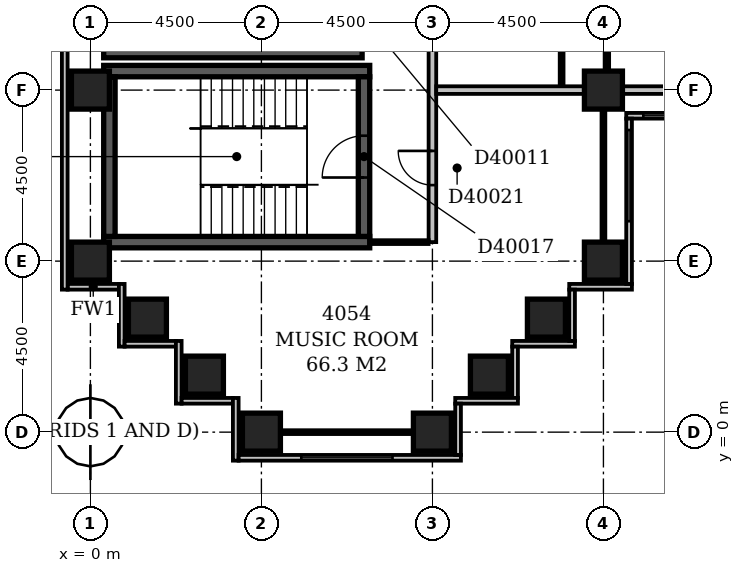
"""IFC4 building model, lengths in metres.
Left out: names, types, materials, properties, quantities, classifications, styles, units other than length and angle.
Written with IfcOpenShell. Run it as: python <this file> out.ifc"""

import sys

from ifc_helpers import new_model, si_unit, direction, frame, frame_2d, origin, origin_2d, place, context, subcontext, project, spatial, rectangle, extrude, element, fill, save


model = new_model("IFC4")
c1 = context("Model", 3, precision=1e-05, world=origin(), true_north=direction((0.0, 1.0)))
c2 = subcontext(c1, "Body", "Model", "MODEL_VIEW")
j1 = project(units=[si_unit("LENGTHUNIT", "METRE"), si_unit("PLANEANGLEUNIT", "RADIAN")], contexts=[c1])
p1 = place(None, origin())
s1 = spatial("IfcSite", under=j1, at=p1, CompositionType="ELEMENT")
p2 = place(p1, origin())
s2 = spatial("IfcBuilding", under=s1, at=p2, CompositionType="ELEMENT")
p3 = place(p2, frame((0.0, 0.0, 159.2)))
s3 = spatial("IfcBuildingStorey", under=s2, at=p3, CompositionType="ELEMENT", Elevation=159.2)
for number, where, z_axis, x_axis in (
    (1, (0.35, 5.0, -0.3), (0.0, 0.0, 1.0), (1.0, 0.0, 0.0)),
    (2, (0.35, 9.5, -0.3), (0.0, 0.0, 1.0), (1.0, 0.0, 0.0)),
):
    element("IfcWall", number, at=place(p3, frame(where, z_axis=z_axis, x_axis=x_axis)), inside=s3, PredefinedType="SHEAR", context=c2, shape_type="SweptSolid", body=[
        extrude(rectangle(XDim=7.0, YDim=0.3, at=frame_2d((3.5, 0.0))), origin(), (0.0, 0.0, 1.0), 3.6),
    ])
p4 = place(p3, frame((0.35, 10.0, -0.3), z_axis=(0.0, 0.0, 1.0), x_axis=(1.0, 0.0, 0.0)))
e3 = element("IfcWall", 3, at=p4, inside=s3, PredefinedType="SHEAR", context=c2, shape_type="SweptSolid", body=[
    extrude(rectangle(XDim=6.8, YDim=0.3, at=frame_2d((3.4, 0.0))), origin(), (0.0, 0.0, 1.0), 3.6),
])
p5 = place(p3, frame((0.5, 5.15, -0.3), z_axis=(0.0, 0.0, 1.0), x_axis=(0.0, 1.0, 0.0)))
e4 = element("IfcWall", 4, at=p5, inside=s3, PredefinedType="SHEAR", context=c2, shape_type="SweptSolid", body=[
    extrude(rectangle(XDim=4.2, YDim=0.3, at=frame_2d((2.1, 0.0))), origin(), (0.0, 0.0, 1.0), 3.6),
])
p6 = place(p3, frame((7.2, 5.15, -0.3), z_axis=(0.0, 0.0, 1.0), x_axis=(0.0, 1.0, 0.0)))
e5 = element("IfcWall", 5, at=p6, inside=s3, PredefinedType="SHEAR", context=c2, shape_type="SweptSolid", body=[
    extrude(rectangle(XDim=4.2, YDim=0.3, at=frame_2d((2.1, 0.0))), origin(), (0.0, 0.0, 1.0), 3.6),
])
p7 = place(p6, frame((1.55, 0.0, 0.3)))
e6 = element("IfcOpeningElement", 6, at=p7, cuts=e5, PredefinedType="OPENING", context=c2, shape_type="SweptSolid", body=[
    extrude(rectangle(XDim=1.1, YDim=2.1, at=frame_2d((0.55, 1.05))), frame((0.0, 0.162, 0.0), z_axis=(0.0, -1.0, 0.0), x_axis=(1.0, 0.0, 0.0)), (0.0, 0.0, 1.0), 0.324),
])
for number, where, z_axis, x_axis in (
    (7, (4.5, 0.0, -0.3), (0.0, 0.0, 1.0), (1.0, 0.0, 0.0)),
    (8, (9.0, 0.0, -0.3), (0.0, 0.0, 1.0), (1.0, 0.0, 0.0)),
    (9, (3.0, 1.5, -0.3), (0.0, 0.0, 1.0), (1.0, 0.0, 0.0)),
    (10, (10.5, 1.5, -0.3), (0.0, 0.0, 1.0), (1.0, 0.0, 0.0)),
    (11, (1.5, 3.0, -0.3), (0.0, 0.0, 1.0), (1.0, 0.0, 0.0)),
    (12, (12.0, 3.0, -0.3), (0.0, 0.0, 1.0), (1.0, 0.0, 0.0)),
    (13, (0.0, 4.5, -0.3), (0.0, 0.0, 1.0), (1.0, 0.0, 0.0)),
    (14, (13.5, 4.5, -0.3), (0.0, 0.0, 1.0), (1.0, 0.0, 0.0)),
    (15, (0.0, 9.0, -0.3), (0.0, 0.0, 1.0), (1.0, 0.0, 0.0)),
    (16, (13.5, 9.0, -0.3), (0.0, 0.0, 1.0), (1.0, 0.0, 0.0)),
):
    element("IfcColumn", number, at=place(p3, frame(where, z_axis=z_axis, x_axis=x_axis)), inside=s3, PredefinedType="COLUMN", context=c2, shape_type="SweptSolid", body=[
        extrude(rectangle(XDim=1.0, YDim=1.0, at=origin_2d()), origin(), (0.0, 0.0, 1.0), 3.6),
    ])
p8 = place(p3, frame((9.675, -0.6, 0.0), z_axis=(0.0, 0.0, 1.0), x_axis=(0.0, 1.0, 0.0)))
e17 = element("IfcWall", 17, at=p8, inside=s3, PredefinedType="STANDARD", context=c2, shape_type="SweptSolid", body=[
    extrude(rectangle(XDim=1.35, YDim=0.15, at=frame_2d((0.675, 0.0))), origin(), (0.0, 0.0, 1.0), 2.7),
])
p9 = place(p3, frame((9.6, 0.825, 0.0), z_axis=(0.0, 0.0, 1.0), x_axis=(1.0, 0.0, 0.0)))
e18 = element("IfcWall", 18, at=p9, inside=s3, PredefinedType="STANDARD", context=c2, shape_type="SweptSolid", body=[
    extrude(rectangle(XDim=1.65, YDim=0.15, at=frame_2d((0.825, 0.0))), origin(), (0.0, 0.0, 1.0), 2.7),
])
p10 = place(p3, frame((11.175, 0.9, 0.0), z_axis=(0.0, 0.0, 1.0), x_axis=(0.0, 1.0, 0.0)))
e19 = element("IfcWall", 19, at=p10, inside=s3, PredefinedType="STANDARD", context=c2, shape_type="SweptSolid", body=[
    extrude(rectangle(XDim=1.35, YDim=0.15, at=frame_2d((0.675, 0.0))), origin(), (0.0, 0.0, 1.0), 2.7),
])
p11 = place(p3, frame((11.1, 2.325, 0.0), z_axis=(0.0, 0.0, 1.0), x_axis=(1.0, 0.0, 0.0)))
e20 = element("IfcWall", 20, at=p11, inside=s3, PredefinedType="STANDARD", context=c2, shape_type="SweptSolid", body=[
    extrude(rectangle(XDim=1.65, YDim=0.15, at=frame_2d((0.825, 0.0))), origin(), (0.0, 0.0, 1.0), 2.7),
])
p12 = place(p3, frame((12.675, 2.4, 0.0), z_axis=(0.0, 0.0, 1.0), x_axis=(0.0, 1.0, 0.0)))
e21 = element("IfcWall", 21, at=p12, inside=s3, PredefinedType="STANDARD", context=c2, shape_type="SweptSolid", body=[
    extrude(rectangle(XDim=1.35, YDim=0.15, at=frame_2d((0.675, 0.0))), origin(), (0.0, 0.0, 1.0), 2.7),
])
p13 = place(p3, frame((12.6, 3.825, 0.0), z_axis=(0.0, 0.0, 1.0), x_axis=(1.0, 0.0, 0.0)))
e22 = element("IfcWall", 22, at=p13, inside=s3, PredefinedType="STANDARD", context=c2, shape_type="SweptSolid", body=[
    extrude(rectangle(XDim=1.65, YDim=0.15, at=frame_2d((0.825, 0.0))), origin(), (0.0, 0.0, 1.0), 2.7),
])
p14 = place(p3, frame((14.175, 3.9, 0.0), z_axis=(0.0, 0.0, 1.0), x_axis=(0.0, 1.0, 0.0)))
e23 = element("IfcWall", 23, at=p14, inside=s3, PredefinedType="STANDARD", context=c2, shape_type="SweptSolid", body=[
    extrude(rectangle(XDim=4.35, YDim=0.15, at=frame_2d((2.175, 0.0))), origin(), (0.0, 0.0, 1.0), 2.7),
])
p15 = place(p14, frame((1.65, 0.0, 0.6)))
e24 = element("IfcOpeningElement", 24, at=p15, cuts=e23, PredefinedType="OPENING", context=c2, shape_type="SweptSolid", body=[
    extrude(rectangle(XDim=2.4, YDim=1.8, at=frame_2d((1.2, 0.9))), frame((0.0, 0.087, 0.0), z_axis=(0.0, -1.0, 0.0), x_axis=(1.0, 0.0, 0.0)), (0.0, 0.0, 1.0), 0.174),
])
p16 = place(p3, frame((14.1, 8.325, 0.0), z_axis=(0.0, 0.0, 1.0), x_axis=(1.0, 0.0, 0.0)))
e25 = element("IfcWall", 25, at=p16, inside=s3, PredefinedType="STANDARD", context=c2, shape_type="SweptSolid", body=[
    extrude(rectangle(XDim=4.65, YDim=0.15, at=frame_2d((2.325, 0.0))), origin(), (0.0, 0.0, 1.0), 2.7),
])
p17 = place(p16, frame((0.45, 0.0, 0.6)))
e26 = element("IfcOpeningElement", 26, at=p17, cuts=e25, PredefinedType="OPENING", context=c2, shape_type="SweptSolid", body=[
    extrude(rectangle(XDim=2.4, YDim=1.8, at=frame_2d((1.2, 0.9))), frame((0.0, 0.087, 0.0), z_axis=(0.0, -1.0, 0.0), x_axis=(1.0, 0.0, 0.0)), (0.0, 0.0, 1.0), 0.174),
])
p18 = place(p3, frame((-0.675, 59.1, 0.0), z_axis=(0.0, 0.0, 1.0), x_axis=(0.0, -1.0, 0.0)))
e27 = element("IfcWall", 27, at=p18, inside=s3, PredefinedType="STANDARD", context=c2, shape_type="SweptSolid", body=[
    extrude(rectangle(XDim=55.35, YDim=0.15, at=frame_2d((27.675, 0.0))), origin(), (0.0, 0.0, 1.0), 2.7),
])
p19 = place(p18, frame((43.04, 0.0, 0.6)))
e28 = element("IfcOpeningElement", 28, at=p19, cuts=e27, PredefinedType="OPENING", context=c2, shape_type="SweptSolid", body=[
    extrude(rectangle(XDim=1.8, YDim=1.8, at=frame_2d((0.9, 0.9))), frame((0.0, 0.087, 0.0), z_axis=(0.0, -1.0, 0.0), x_axis=(1.0, 0.0, 0.0)), (0.0, 0.0, 1.0), 0.174),
])
p20 = place(p3, frame((-0.6, 3.825, 0.0), z_axis=(0.0, 0.0, 1.0), x_axis=(1.0, 0.0, 0.0)))
e29 = element("IfcWall", 29, at=p20, inside=s3, PredefinedType="STANDARD", context=c2, shape_type="SweptSolid", body=[
    extrude(rectangle(XDim=1.35, YDim=0.15, at=frame_2d((0.675, 0.0))), origin(), (0.0, 0.0, 1.0), 2.7),
])
p21 = place(p3, frame((0.825, 3.9, 0.0), z_axis=(0.0, 0.0, 1.0), x_axis=(0.0, -1.0, 0.0)))
e30 = element("IfcWall", 30, at=p21, inside=s3, PredefinedType="STANDARD", context=c2, shape_type="SweptSolid", body=[
    extrude(rectangle(XDim=1.65, YDim=0.15, at=frame_2d((0.825, 0.0))), origin(), (0.0, 0.0, 1.0), 2.7),
])
p22 = place(p3, frame((0.9, 2.325, 0.0), z_axis=(0.0, 0.0, 1.0), x_axis=(1.0, 0.0, 0.0)))
e31 = element("IfcWall", 31, at=p22, inside=s3, PredefinedType="STANDARD", context=c2, shape_type="SweptSolid", body=[
    extrude(rectangle(XDim=1.35, YDim=0.15, at=frame_2d((0.675, 0.0))), origin(), (0.0, 0.0, 1.0), 2.7),
])
p23 = place(p3, frame((2.325, 2.4, 0.0), z_axis=(0.0, 0.0, 1.0), x_axis=(0.0, -1.0, 0.0)))
e32 = element("IfcWall", 32, at=p23, inside=s3, PredefinedType="STANDARD", context=c2, shape_type="SweptSolid", body=[
    extrude(rectangle(XDim=1.65, YDim=0.15, at=frame_2d((0.825, 0.0))), origin(), (0.0, 0.0, 1.0), 2.7),
])
p24 = place(p3, frame((2.4, 0.825, 0.0), z_axis=(0.0, 0.0, 1.0), x_axis=(1.0, 0.0, 0.0)))
e33 = element("IfcWall", 33, at=p24, inside=s3, PredefinedType="STANDARD", context=c2, shape_type="SweptSolid", body=[
    extrude(rectangle(XDim=1.35, YDim=0.15, at=frame_2d((0.675, 0.0))), origin(), (0.0, 0.0, 1.0), 2.7),
])
p25 = place(p3, frame((3.825, 0.9, 0.0), z_axis=(0.0, 0.0, 1.0), x_axis=(0.0, -1.0, 0.0)))
e34 = element("IfcWall", 34, at=p25, inside=s3, PredefinedType="STANDARD", context=c2, shape_type="SweptSolid", body=[
    extrude(rectangle(XDim=1.65, YDim=0.15, at=frame_2d((0.825, 0.0))), origin(), (0.0, 0.0, 1.0), 2.7),
])
p26 = place(p3, frame((3.9, -0.675, 0.0), z_axis=(0.0, 0.0, 1.0), x_axis=(1.0, 0.0, 0.0)))
e35 = element("IfcWall", 35, at=p26, inside=s3, PredefinedType="STANDARD", context=c2, shape_type="SweptSolid", body=[
    extrude(rectangle(XDim=5.85, YDim=0.15, at=frame_2d((2.925, 0.0))), origin(), (0.0, 0.0, 1.0), 2.7),
])
p27 = place(p26, frame((1.65, 0.0, 0.6)))
e36 = element("IfcOpeningElement", 36, at=p27, cuts=e35, PredefinedType="OPENING", context=c2, shape_type="SweptSolid", body=[
    extrude(rectangle(XDim=2.4, YDim=1.8, at=frame_2d((1.2, 0.9))), frame((0.0, 0.087, 0.0), z_axis=(0.0, -1.0, 0.0), x_axis=(1.0, 0.0, 0.0)), (0.0, 0.0, 1.0), 0.174),
])
p28 = place(p3, frame((5.0, 0.0, 0.0), z_axis=(0.0, 0.0, 1.0), x_axis=(1.0, 0.0, 0.0)))
e37 = element("IfcWall", 37, at=p28, inside=s3, PredefinedType="PARTITIONING", context=c2, shape_type="SweptSolid", body=[
    extrude(rectangle(XDim=3.5, YDim=0.1, at=frame_2d((1.75, 0.0))), origin(), (0.0, 0.0, 1.0), 2.7),
])
p29 = place(p3, frame((0.0, 4.5, 0.0), z_axis=(0.0, 0.0, 1.0), x_axis=(0.0, 1.0, 0.0)))
e38 = element("IfcWall", 38, at=p29, inside=s3, PredefinedType="PARTITIONING", context=c2, shape_type="SweptSolid", body=[
    extrude(rectangle(XDim=0.5, YDim=0.1, at=frame_2d((0.25, 0.0))), origin(), (0.0, 0.0, 1.0), 2.7),
])
p30 = place(p3, frame((7.349, 5.0, 0.0), z_axis=(0.0, 0.0, 1.0), x_axis=(1.0, 0.0, 0.0)))
e39 = element("IfcWall", 39, at=p30, inside=s3, PredefinedType="PARTITIONING", context=c2, shape_type="SweptSolid", body=[
    extrude(rectangle(XDim=1.551, YDim=0.1, at=frame_2d((0.775, 0.0))), origin(), (0.0, 0.0, 1.0), 3.3),
])
p31 = place(p3, frame((9.0, 5.0, 0.0), z_axis=(0.0, 0.0, 1.0), x_axis=(0.0, 1.0, 0.0)))
e40 = element("IfcWall", 40, at=p31, inside=s3, PredefinedType="PARTITIONING", context=c2, shape_type="SweptSolid", body=[
    extrude(rectangle(XDim=27.75, YDim=0.2, at=frame_2d((13.875, 0.0))), origin(), (0.0, 0.0, 1.0), 3.3),
])
p32 = place(p31, frame((22.8, 0.0, 0.0)))
e41 = element("IfcOpeningElement", 41, at=p32, cuts=e40, PredefinedType="OPENING", context=c2, shape_type="SweptSolid", body=[
    extrude(rectangle(XDim=1.0, YDim=2.1, at=frame_2d((0.5, 1.05))), frame((0.0, 0.112, 0.0), z_axis=(0.0, -1.0, 0.0), x_axis=(1.0, 0.0, 0.0)), (0.0, 0.0, 1.0), 0.224),
])
p33 = place(p31, frame((14.95, 0.0, 0.0)))
e42 = element("IfcOpeningElement", 42, at=p33, cuts=e40, PredefinedType="OPENING", context=c2, shape_type="SweptSolid", body=[
    extrude(rectangle(XDim=1.0, YDim=2.1, at=frame_2d((0.5, 1.05))), frame((0.0, 0.112, 0.0), z_axis=(0.0, -1.0, 0.0), x_axis=(1.0, 0.0, 0.0)), (0.0, 0.0, 1.0), 0.224),
])
p34 = place(p31, frame((9.3, 0.0, 0.0)))
e43 = element("IfcOpeningElement", 43, at=p34, cuts=e40, PredefinedType="OPENING", context=c2, shape_type="SweptSolid", body=[
    extrude(rectangle(XDim=1.0, YDim=2.1, at=frame_2d((0.5, 1.05))), frame((0.0, 0.112, 0.0), z_axis=(0.0, -1.0, 0.0), x_axis=(1.0, 0.0, 0.0)), (0.0, 0.0, 1.0), 0.224),
])
p35 = place(p31, frame((1.5, 0.0, 0.0)))
e44 = element("IfcOpeningElement", 44, at=p35, cuts=e40, PredefinedType="OPENING", context=c2, shape_type="SweptSolid", body=[
    extrude(rectangle(XDim=0.9, YDim=2.1, at=frame_2d((0.45, 1.05))), frame((0.0, 0.112, 0.0), z_axis=(0.0, -1.0, 0.0), x_axis=(1.0, 0.0, 0.0)), (0.0, 0.0, 1.0), 0.224),
])
p36 = place(p3, frame((13.5, 5.0, 0.0), z_axis=(0.0, 0.0, 1.0), x_axis=(0.0, 1.0, 0.0)))
e45 = element("IfcWall", 45, at=p36, inside=s3, PredefinedType="PARTITIONING", context=c2, shape_type="SweptSolid", body=[
    extrude(rectangle(XDim=3.5, YDim=0.1, at=frame_2d((1.75, 0.0))), origin(), (0.0, 0.0, 1.0), 2.7),
])
p37 = place(p3, frame((9.1, 9.0, 0.0), z_axis=(0.0, 0.0, 1.0), x_axis=(1.0, 0.0, 0.0)))
e46 = element("IfcWall", 46, at=p37, inside=s3, PredefinedType="PARTITIONING", context=c2, shape_type="SweptSolid", body=[
    extrude(rectangle(XDim=3.9, YDim=0.2, at=frame_2d((1.95, 0.0))), origin(), (0.0, 0.0, 1.0), 3.3),
])
p38 = place(p3, frame((14.0, 9.0, 0.0), z_axis=(0.0, 0.0, 1.0), x_axis=(1.0, 0.0, 0.0)))
e47 = element("IfcWall", 47, at=p38, inside=s3, PredefinedType="PARTITIONING", context=c2, shape_type="SweptSolid", body=[
    extrude(rectangle(XDim=3.5, YDim=0.2, at=frame_2d((1.75, 0.0))), origin(), (0.0, 0.0, 1.0), 2.7),
])
p39 = place(p3, frame((12.4, 9.1, 0.0), z_axis=(0.0, 0.0, 1.0), x_axis=(0.0, 1.0, 0.0)))
e48 = element("IfcWall", 48, at=p39, inside=s3, PredefinedType="PARTITIONING", context=c2, shape_type="SweptSolid", body=[
    extrude(rectangle(XDim=4.9, YDim=0.1, at=frame_2d((2.45, 0.0))), origin(), (0.0, 0.0, 1.0), 3.3),
])
p40 = place(p39, frame((1.95, 0.0, 0.0)))
e49 = element("IfcOpeningElement", 49, at=p40, cuts=e48, PredefinedType="OPENING", context=c2, shape_type="SweptSolid", body=[
    extrude(rectangle(XDim=0.9, YDim=2.1, at=frame_2d((0.45, 1.05))), frame((0.0, 0.062, 0.0), z_axis=(0.0, -1.0, 0.0), x_axis=(1.0, 0.0, 0.0)), (0.0, 0.0, 1.0), 0.124),
])
p41 = place(p3, frame((13.6, 9.5, 0.0), z_axis=(0.0, 0.0, 1.0), x_axis=(0.0, 1.0, 0.0)))
e50 = element("IfcWall", 50, at=p41, inside=s3, PredefinedType="PARTITIONING", context=c2, shape_type="SweptSolid", body=[
    extrude(rectangle(XDim=8.4, YDim=0.1, at=frame_2d((4.2, 0.0))), origin(), (0.0, 0.0, 1.0), 3.3),
])
p42 = place(p41, frame((1.3, 0.0, 0.0)))
e51 = element("IfcOpeningElement", 51, at=p42, cuts=e50, PredefinedType="OPENING", context=c2, shape_type="SweptSolid", body=[
    extrude(rectangle(XDim=0.9, YDim=2.1, at=frame_2d((0.45, 1.05))), frame((0.0, 0.062, 0.0), z_axis=(0.0, -1.0, 0.0), x_axis=(1.0, 0.0, 0.0)), (0.0, 0.0, 1.0), 0.124),
])
p43 = place(p41, frame((5.8, 0.0, 0.0)))
e52 = element("IfcOpeningElement", 52, at=p43, cuts=e50, PredefinedType="OPENING", context=c2, shape_type="SweptSolid", body=[
    extrude(rectangle(XDim=0.9, YDim=2.1, at=frame_2d((0.45, 1.05))), frame((0.0, 0.062, 0.0), z_axis=(0.0, -1.0, 0.0), x_axis=(1.0, 0.0, 0.0)), (0.0, 0.0, 1.0), 0.124),
])
p44 = place(p15, origin())
e53 = element("IfcWindow", 53, at=p44, inside=s3, PartitioningType="SINGLE_PANEL", PredefinedType="WINDOW", context=c2, shape_type="SweptSolid", body=[
    extrude(rectangle(XDim=2.4, YDim=1.8, at=frame_2d((1.2, 0.9))), frame((0.0, 0.03, 0.0), z_axis=(0.0, -1.0, 0.0), x_axis=(1.0, 0.0, 0.0)), (0.0, 0.0, 1.0), 0.06),
])
fill(e24, e53)
p45 = place(p17, origin())
e54 = element("IfcWindow", 54, at=p45, inside=s3, PartitioningType="SINGLE_PANEL", PredefinedType="WINDOW", context=c2, shape_type="SweptSolid", body=[
    extrude(rectangle(XDim=2.4, YDim=1.8, at=frame_2d((1.2, 0.9))), frame((0.0, 0.03, 0.0), z_axis=(0.0, -1.0, 0.0), x_axis=(1.0, 0.0, 0.0)), (0.0, 0.0, 1.0), 0.06),
])
fill(e26, e54)
p46 = place(p27, origin())
e55 = element("IfcWindow", 55, at=p46, inside=s3, PartitioningType="SINGLE_PANEL", PredefinedType="WINDOW", context=c2, shape_type="SweptSolid", body=[
    extrude(rectangle(XDim=2.4, YDim=1.8, at=frame_2d((1.2, 0.9))), frame((0.0, 0.03, 0.0), z_axis=(0.0, -1.0, 0.0), x_axis=(1.0, 0.0, 0.0)), (0.0, 0.0, 1.0), 0.06),
])
fill(e36, e55)
p47 = place(p7, origin())
e56 = element("IfcDoor", 56, at=p47, inside=s3, OperationType="SINGLE_SWING_LEFT", PredefinedType="DOOR", context=c2, shape_type="SweptSolid", body=[
    extrude(rectangle(XDim=1.1, YDim=2.1, at=frame_2d((0.55, 1.05))), frame((0.0, 0.025, 0.0), z_axis=(0.0, -1.0, 0.0), x_axis=(1.0, 0.0, 0.0)), (0.0, 0.0, 1.0), 0.05),
])
fill(e6, e56)
p48 = place(p35, frame((0.9, 0.0, 0.0), z_axis=(0.0, 0.0, 1.0), x_axis=(-1.0, 0.0, 0.0)))
e57 = element("IfcDoor", 57, at=p48, inside=s3, OperationType="SINGLE_SWING_LEFT", PredefinedType="DOOR", context=c2, shape_type="SweptSolid", body=[
    extrude(rectangle(XDim=0.9, YDim=2.1, at=frame_2d((0.45, 1.05))), frame((0.0, 0.025, 0.0), z_axis=(0.0, -1.0, 0.0), x_axis=(1.0, 0.0, 0.0)), (0.0, 0.0, 1.0), 0.05),
])
fill(e44, e57)
save(model, sys.argv[1])
